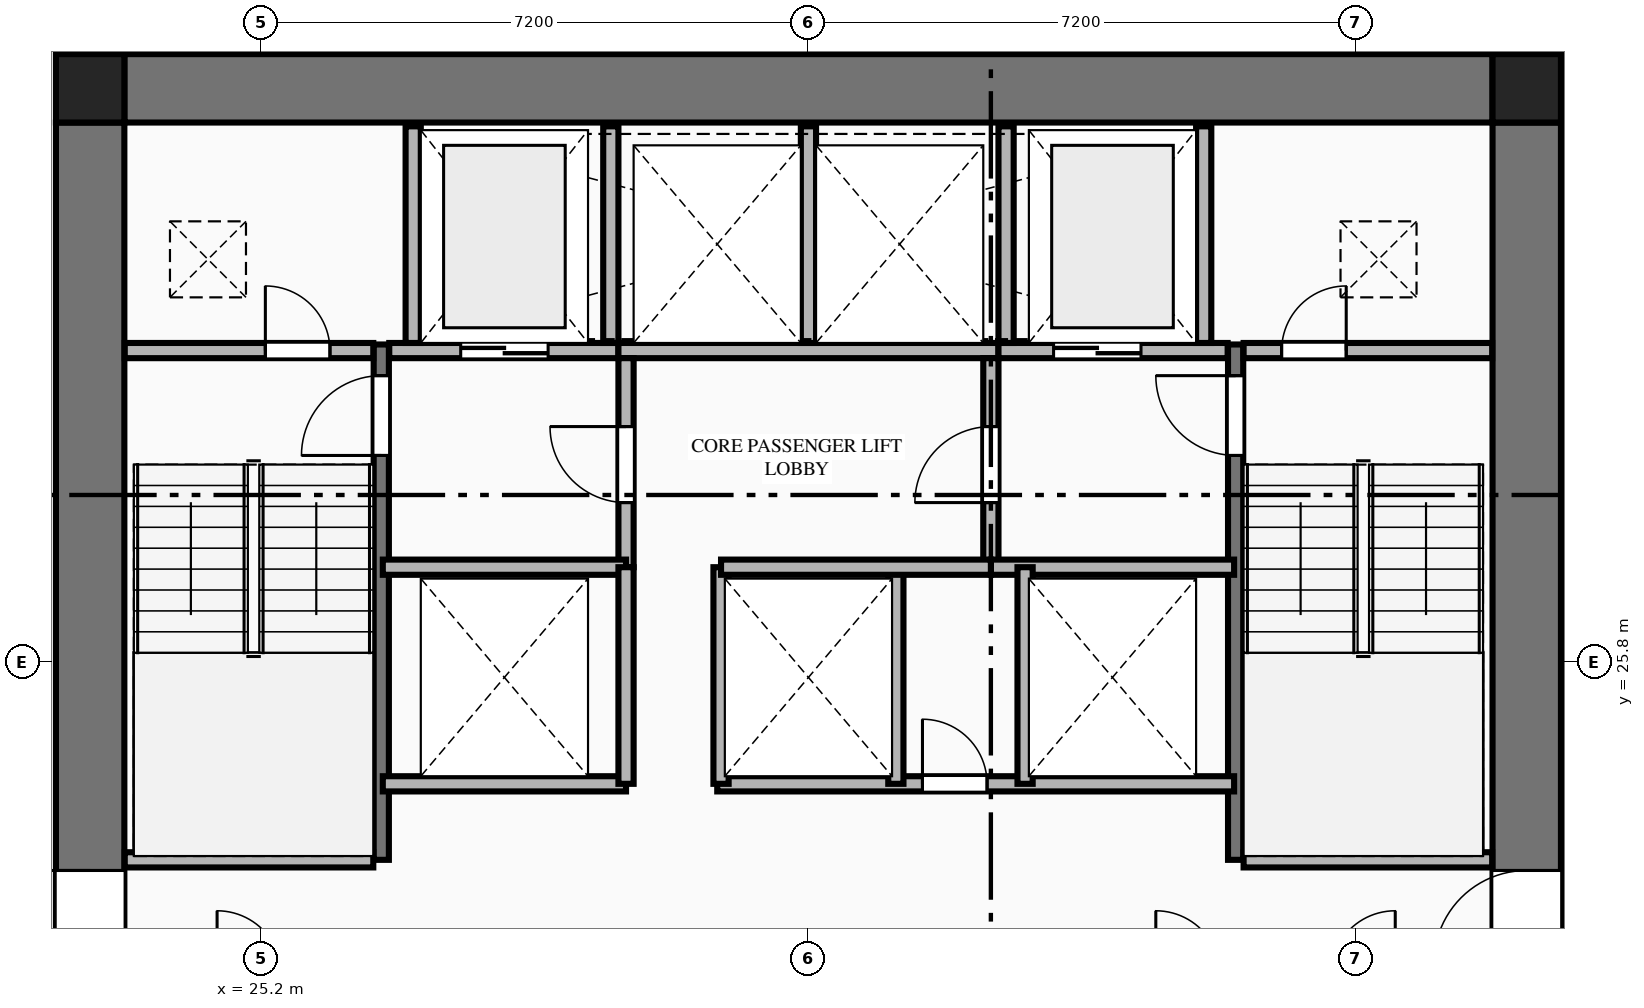
"""IFC4 building model, lengths in metres.
Left out: names, types, materials, properties, quantities, classifications, styles, units other than length and angle.
Written with IfcOpenShell. Run it as: python <this file> out.ifc"""

import sys

from ifc_helpers import new_model, si_unit, direction, frame, frame_2d, origin, origin_2d, place, context, subcontext, project, spatial, rectangle, extrude, element, fill, save


model = new_model("IFC4")
c1 = context("Model", 3, precision=1e-05, world=origin(), true_north=direction((0.0, 1.0)))
c2 = subcontext(c1, "Body", "Model", "MODEL_VIEW")
j1 = project(units=[si_unit("LENGTHUNIT", "METRE"), si_unit("PLANEANGLEUNIT", "RADIAN")], contexts=[c1])
p1 = place(None, origin())
s1 = spatial("IfcSite", under=j1, at=p1, CompositionType="ELEMENT")
p2 = place(p1, origin())
s2 = spatial("IfcBuilding", under=s1, at=p2, CompositionType="ELEMENT")
p3 = place(p2, frame((0.0, 0.0, 60.4)))
s3 = spatial("IfcBuildingStorey", under=s2, at=p3, CompositionType="ELEMENT", Elevation=60.4)
for number, where, z_axis, x_axis in (
    (1, (41.85, 33.35, 0.0), (0.0, 0.0, 1.0), (1.0, 0.0, 0.0)),
    (2, (22.95, 33.35, 0.0), (0.0, 0.0, 1.0), (1.0, 0.0, 0.0)),
):
    element("IfcColumn", number, at=place(p3, frame(where, z_axis=z_axis, x_axis=x_axis)), inside=s3, PredefinedType="COLUMN", context=c2, shape_type="SweptSolid", body=[
        extrude(rectangle(XDim=0.9, YDim=0.9, at=origin_2d()), origin(), (0.0, 0.0, 1.0), 3.55),
    ])
p4 = place(p3, frame((23.4, 33.35, 0.0), z_axis=(0.0, 0.0, 1.0), x_axis=(1.0, 0.0, 0.0)))
e3 = element("IfcWall", 3, at=p4, inside=s3, PredefinedType="SHEAR", context=c2, shape_type="SweptSolid", body=[
    extrude(rectangle(XDim=18.0, YDim=0.9, at=frame_2d((9.0, 0.0))), origin(), (0.0, 0.0, 1.0), 3.33),
])
p5 = place(p3, frame((22.95, 18.9, 0.0), z_axis=(0.0, 0.0, 1.0), x_axis=(0.0, 1.0, 0.0)))
e4 = element("IfcWall", 4, at=p5, inside=s3, PredefinedType="SHEAR", context=c2, shape_type="SweptSolid", body=[
    extrude(rectangle(XDim=14.0, YDim=0.9, at=frame_2d((7.0, 0.0))), origin(), (0.0, 0.0, 1.0), 3.33),
])
p6 = place(p5, frame((2.94, 0.0, 0.0)))
e5 = element("IfcOpeningElement", 5, at=p6, cuts=e4, PredefinedType="OPENING", context=c2, shape_type="SweptSolid", body=[
    extrude(rectangle(XDim=1.22, YDim=2.25, at=frame_2d((0.61, 1.125))), frame((0.0, 0.46, 0.0), z_axis=(0.0, -1.0, 0.0), x_axis=(1.0, 0.0, 0.0)), (0.0, 0.0, 1.0), 0.92),
])
p7 = place(p3, frame((41.85, 18.9, 0.0), z_axis=(0.0, 0.0, 1.0), x_axis=(0.0, 1.0, 0.0)))
e6 = element("IfcWall", 6, at=p7, inside=s3, PredefinedType="SHEAR", context=c2, shape_type="SweptSolid", body=[
    extrude(rectangle(XDim=14.0, YDim=0.9, at=frame_2d((7.0, 0.0))), origin(), (0.0, 0.0, 1.0), 3.33),
])
p8 = place(p7, frame((2.94, 0.0, 0.0)))
e7 = element("IfcOpeningElement", 7, at=p8, cuts=e6, PredefinedType="OPENING", context=c2, shape_type="SweptSolid", body=[
    extrude(rectangle(XDim=1.22, YDim=2.25, at=frame_2d((0.61, 1.125))), frame((0.0, 0.46, 0.0), z_axis=(0.0, -1.0, 0.0), x_axis=(1.0, 0.0, 0.0)), (0.0, 0.0, 1.0), 0.92),
])
p9 = place(p3, frame((26.78, 23.2, 0.0), z_axis=(0.0, 0.0, 1.0), x_axis=(0.0, 1.0, 0.0)))
e8 = element("IfcWall", 8, at=p9, inside=s3, PredefinedType="SHEAR", context=c2, shape_type="SweptSolid", body=[
    extrude(rectangle(XDim=6.78, YDim=0.2, at=frame_2d((3.39, 0.0))), origin(), (0.0, 0.0, 1.0), 3.55),
])
p10 = place(p9, frame((5.32, 0.0, 0.0)))
e9 = element("IfcOpeningElement", 9, at=p10, cuts=e8, PredefinedType="OPENING", context=c2, shape_type="SweptSolid", body=[
    extrude(rectangle(XDim=1.05, YDim=2.15, at=frame_2d((0.525, 1.075))), frame((0.0, 0.11, 0.0), z_axis=(0.0, -1.0, 0.0), x_axis=(1.0, 0.0, 0.0)), (0.0, 0.0, 1.0), 0.22),
])
p11 = place(p3, frame((23.405, 23.2, 0.0), z_axis=(0.0, 0.0, 1.0), x_axis=(1.0, 0.0, 0.0)))
e10 = element("IfcWall", 10, at=p11, inside=s3, PredefinedType="PLUMBINGWALL", context=c2, shape_type="SweptSolid", body=[
    extrude(rectangle(XDim=3.27, YDim=0.2, at=frame_2d((1.635, 0.0))), origin(), (0.0, 0.0, 1.0), 3.33),
])
p12 = place(p3, frame((38.02, 23.2, 0.0), z_axis=(0.0, 0.0, 1.0), x_axis=(0.0, 1.0, 0.0)))
e11 = element("IfcWall", 11, at=p12, inside=s3, PredefinedType="SHEAR", context=c2, shape_type="SweptSolid", body=[
    extrude(rectangle(XDim=6.78, YDim=0.2, at=frame_2d((3.39, 0.0))), origin(), (0.0, 0.0, 1.0), 3.55),
])
p13 = place(p12, frame((5.32, 0.0, 0.0)))
e12 = element("IfcOpeningElement", 12, at=p13, cuts=e11, PredefinedType="OPENING", context=c2, shape_type="SweptSolid", body=[
    extrude(rectangle(XDim=1.05, YDim=2.15, at=frame_2d((0.525, 1.075))), frame((0.0, 0.11, 0.0), z_axis=(0.0, -1.0, 0.0), x_axis=(1.0, 0.0, 0.0)), (0.0, 0.0, 1.0), 0.22),
])
p14 = place(p3, frame((38.125, 23.2, 0.0), z_axis=(0.0, 0.0, 1.0), x_axis=(1.0, 0.0, 0.0)))
e13 = element("IfcWall", 13, at=p14, inside=s3, PredefinedType="PLUMBINGWALL", context=c2, shape_type="SweptSolid", body=[
    extrude(rectangle(XDim=3.27, YDim=0.2, at=frame_2d((1.635, 0.0))), origin(), (0.0, 0.0, 1.0), 3.33),
])
p15 = place(p3, frame((23.405, 29.9, 0.0), z_axis=(0.0, 0.0, 1.0), x_axis=(1.0, 0.0, 0.0)))
e14 = element("IfcWall", 14, at=p15, inside=s3, PredefinedType="PLUMBINGWALL", context=c2, shape_type="SweptSolid", body=[
    extrude(rectangle(XDim=3.27, YDim=0.2, at=frame_2d((1.635, 0.0))), origin(), (0.0, 0.0, 1.0), 3.33),
])
p16 = place(p15, frame((1.85, 0.0, 0.0)))
e15 = element("IfcOpeningElement", 15, at=p16, cuts=e14, PredefinedType="OPENING", context=c2, shape_type="SweptSolid", body=[
    extrude(rectangle(XDim=0.85, YDim=2.05, at=frame_2d((0.425, 1.025))), frame((0.0, 0.11, 0.0), z_axis=(0.0, -1.0, 0.0), x_axis=(1.0, 0.0, 0.0)), (0.0, 0.0, 1.0), 0.22),
])
p17 = place(p3, frame((26.885, 29.9, 0.0), z_axis=(0.0, 0.0, 1.0), x_axis=(1.0, 0.0, 0.0)))
e16 = element("IfcWall", 16, at=p17, inside=s3, PredefinedType="PLUMBINGWALL", context=c2, shape_type="SweptSolid", body=[
    extrude(rectangle(XDim=3.015, YDim=0.2, at=frame_2d((1.507, 0.0))), origin(), (0.0, 0.0, 1.0), 3.33),
])
p18 = place(p17, frame((0.94, 0.0, 0.0)))
e17 = element("IfcOpeningElement", 17, at=p18, cuts=e16, PredefinedType="OPENING", context=c2, shape_type="SweptSolid", body=[
    extrude(rectangle(XDim=1.15, YDim=2.2, at=frame_2d((0.575, 1.1))), frame((0.0, 0.11, 0.0), z_axis=(0.0, -1.0, 0.0), x_axis=(1.0, 0.0, 0.0)), (0.0, 0.0, 1.0), 0.22),
])
p19 = place(p3, frame((29.9, 29.9, 0.0), z_axis=(0.0, 0.0, 1.0), x_axis=(1.0, 0.0, 0.0)))
e18 = element("IfcWall", 18, at=p19, inside=s3, PredefinedType="PLUMBINGWALL", context=c2, shape_type="SweptSolid", body=[
    extrude(rectangle(XDim=5.0, YDim=0.2, at=frame_2d((2.5, 0.0))), origin(), (0.0, 0.0, 1.0), 3.33),
])
p20 = place(p3, frame((34.9, 29.9, 0.0), z_axis=(0.0, 0.0, 1.0), x_axis=(1.0, 0.0, 0.0)))
e19 = element("IfcWall", 19, at=p20, inside=s3, PredefinedType="PLUMBINGWALL", context=c2, shape_type="SweptSolid", body=[
    extrude(rectangle(XDim=3.015, YDim=0.2, at=frame_2d((1.508, 0.0))), origin(), (0.0, 0.0, 1.0), 3.33),
])
p21 = place(p20, frame((0.725, 0.0, 0.0)))
e20 = element("IfcOpeningElement", 20, at=p21, cuts=e19, PredefinedType="OPENING", context=c2, shape_type="SweptSolid", body=[
    extrude(rectangle(XDim=1.15, YDim=2.2, at=frame_2d((0.575, 1.1))), frame((0.0, 0.11, 0.0), z_axis=(0.0, -1.0, 0.0), x_axis=(1.0, 0.0, 0.0)), (0.0, 0.0, 1.0), 0.22),
])
p22 = place(p3, frame((38.125, 29.9, 0.0), z_axis=(0.0, 0.0, 1.0), x_axis=(1.0, 0.0, 0.0)))
e21 = element("IfcWall", 21, at=p22, inside=s3, PredefinedType="PLUMBINGWALL", context=c2, shape_type="SweptSolid", body=[
    extrude(rectangle(XDim=3.27, YDim=0.2, at=frame_2d((1.635, 0.0))), origin(), (0.0, 0.0, 1.0), 3.33),
])
p23 = place(p22, frame((0.5, 0.0, 0.0)))
e22 = element("IfcOpeningElement", 22, at=p23, cuts=e21, PredefinedType="OPENING", context=c2, shape_type="SweptSolid", body=[
    extrude(rectangle(XDim=0.85, YDim=2.05, at=frame_2d((0.425, 1.025))), frame((0.0, 0.11, 0.0), z_axis=(0.0, -1.0, 0.0), x_axis=(1.0, 0.0, 0.0)), (0.0, 0.0, 1.0), 0.22),
])
for number, where, z_axis, x_axis in (
    (23, (27.2, 30.0, 0.0), (0.0, 0.0, 1.0), (0.0, 1.0, 0.0)),
    (24, (29.8, 30.0, 0.0), (0.0, 0.0, 1.0), (0.0, 1.0, 0.0)),
    (25, (32.4, 30.0, 0.0), (0.0, 0.0, 1.0), (0.0, 1.0, 0.0)),
    (26, (35.0, 30.0, 0.0), (0.0, 0.0, 1.0), (0.0, 1.0, 0.0)),
    (27, (37.6, 30.0, 0.0), (0.0, 0.0, 1.0), (0.0, 1.0, 0.0)),
):
    element("IfcWall", number, at=place(p3, frame(where, z_axis=z_axis, x_axis=x_axis)), inside=s3, PredefinedType="PLUMBINGWALL", context=c2, shape_type="SweptSolid", body=[
        extrude(rectangle(XDim=2.85, YDim=0.2, at=frame_2d((1.425, 0.0))), origin(), (0.0, 0.0, 1.0), 3.33),
    ])
p24 = place(p3, frame((30.0, 27.05, 0.0), z_axis=(0.0, 0.0, 1.0), x_axis=(0.0, 1.0, 0.0)))
e28 = element("IfcWall", 28, at=p24, inside=s3, PredefinedType="PLUMBINGWALL", context=c2, shape_type="SweptSolid", body=[
    extrude(rectangle(XDim=2.75, YDim=0.2, at=frame_2d((1.375, 0.0))), origin(), (0.0, 0.0, 1.0), 3.33),
])
p25 = place(p24, frame((0.85, 0.0, 0.0)))
e29 = element("IfcOpeningElement", 29, at=p25, cuts=e28, PredefinedType="OPENING", context=c2, shape_type="SweptSolid", body=[
    extrude(rectangle(XDim=1.0, YDim=2.15, at=frame_2d((0.5, 1.075))), frame((0.0, 0.11, 0.0), z_axis=(0.0, -1.0, 0.0), x_axis=(1.0, 0.0, 0.0)), (0.0, 0.0, 1.0), 0.22),
])
p26 = place(p3, frame((26.8, 27.05, 0.0), z_axis=(0.0, 0.0, 1.0), x_axis=(1.0, 0.0, 0.0)))
e30 = element("IfcWall", 30, at=p26, inside=s3, PredefinedType="PLUMBINGWALL", context=c2, shape_type="SweptSolid", body=[
    extrude(rectangle(XDim=3.2, YDim=0.2, at=frame_2d((1.6, 0.0))), origin(), (0.0, 0.0, 1.0), 3.33),
])
p27 = place(p3, frame((34.8, 27.05, 0.0), z_axis=(0.0, 0.0, 1.0), x_axis=(0.0, 1.0, 0.0)))
e31 = element("IfcWall", 31, at=p27, inside=s3, PredefinedType="PLUMBINGWALL", context=c2, shape_type="SweptSolid", body=[
    extrude(rectangle(XDim=2.75, YDim=0.2, at=frame_2d((1.375, 0.0))), origin(), (0.0, 0.0, 1.0), 3.33),
])
p28 = place(p27, frame((0.85, 0.0, 0.0)))
e32 = element("IfcOpeningElement", 32, at=p28, cuts=e31, PredefinedType="OPENING", context=c2, shape_type="SweptSolid", body=[
    extrude(rectangle(XDim=1.0, YDim=2.15, at=frame_2d((0.5, 1.075))), frame((0.0, 0.11, 0.0), z_axis=(0.0, -1.0, 0.0), x_axis=(1.0, 0.0, 0.0)), (0.0, 0.0, 1.0), 0.22),
])
for number, where, z_axis, x_axis in (
    (33, (34.8, 27.05, 0.0), (0.0, 0.0, 1.0), (1.0, 0.0, 0.0)),
    (34, (26.8, 24.2, 0.0), (0.0, 0.0, 1.0), (1.0, 0.0, 0.0)),
):
    element("IfcWall", number, at=place(p3, frame(where, z_axis=z_axis, x_axis=x_axis)), inside=s3, PredefinedType="PLUMBINGWALL", context=c2, shape_type="SweptSolid", body=[
        extrude(rectangle(XDim=3.2, YDim=0.2, at=frame_2d((1.6, 0.0))), origin(), (0.0, 0.0, 1.0), 3.33),
    ])
p29 = place(p3, frame((30.0, 24.2, 0.0), z_axis=(0.0, 0.0, 1.0), x_axis=(0.0, 1.0, 0.0)))
e35 = element("IfcWall", 35, at=p29, inside=s3, PredefinedType="PLUMBINGWALL", context=c2, shape_type="SweptSolid", body=[
    extrude(rectangle(XDim=2.85, YDim=0.2, at=frame_2d((1.425, 0.0))), origin(), (0.0, 0.0, 1.0), 3.33),
])
p30 = place(p3, frame((31.2, 24.2, 0.0), z_axis=(0.0, 0.0, 1.0), x_axis=(1.0, 0.0, 0.0)))
e36 = element("IfcWall", 36, at=p30, inside=s3, PredefinedType="PLUMBINGWALL", context=c2, shape_type="SweptSolid", body=[
    extrude(rectangle(XDim=6.8, YDim=0.2, at=frame_2d((3.4, 0.0))), origin(), (0.0, 0.0, 1.0), 3.33),
])
p31 = place(p30, frame((2.7, 0.0, 0.0)))
e37 = element("IfcOpeningElement", 37, at=p31, cuts=e36, PredefinedType="OPENING", context=c2, shape_type="SweptSolid", body=[
    extrude(rectangle(XDim=0.85, YDim=2.05, at=frame_2d((0.425, 1.025))), frame((0.0, 0.11, 0.0), z_axis=(0.0, -1.0, 0.0), x_axis=(1.0, 0.0, 0.0)), (0.0, 0.0, 1.0), 0.22),
])
for number, where, z_axis, x_axis in (
    (38, (31.25, 24.2, 0.0), (0.0, 0.0, 1.0), (0.0, 1.0, 0.0)),
    (39, (33.55, 24.2, 0.0), (0.0, 0.0, 1.0), (0.0, 1.0, 0.0)),
    (40, (35.25, 24.2, 0.0), (0.0, 0.0, 1.0), (0.0, 1.0, 0.0)),
):
    element("IfcWall", number, at=place(p3, frame(where, z_axis=z_axis, x_axis=x_axis)), inside=s3, PredefinedType="PLUMBINGWALL", context=c2, shape_type="SweptSolid", body=[
        extrude(rectangle(XDim=2.85, YDim=0.2, at=frame_2d((1.425, 0.0))), origin(), (0.0, 0.0, 1.0), 3.33),
    ])
p32 = place(p3, frame((31.25, 27.05, 0.0), z_axis=(0.0, 0.0, 1.0), x_axis=(1.0, 0.0, 0.0)))
e41 = element("IfcWall", 41, at=p32, inside=s3, PredefinedType="PLUMBINGWALL", context=c2, shape_type="SweptSolid", body=[
    extrude(rectangle(XDim=3.55, YDim=0.2, at=frame_2d((1.775, 0.0))), origin(), (0.0, 0.0, 1.0), 3.33),
])
p33 = place(p6, origin())
e42 = element("IfcDoor", 42, at=p33, inside=s3, OperationType="SINGLE_SWING_RIGHT", PredefinedType="DOOR", context=c2, shape_type="SweptSolid", body=[
    extrude(rectangle(XDim=1.22, YDim=2.25, at=frame_2d((0.61, 1.125))), frame((0.0, 0.025, 0.0), z_axis=(0.0, -1.0, 0.0), x_axis=(1.0, 0.0, 0.0)), (0.0, 0.0, 1.0), 0.05),
])
fill(e5, e42)
p34 = place(p8, origin())
e43 = element("IfcDoor", 43, at=p34, inside=s3, OperationType="SINGLE_SWING_LEFT", PredefinedType="DOOR", context=c2, shape_type="SweptSolid", body=[
    extrude(rectangle(XDim=1.22, YDim=2.25, at=frame_2d((0.61, 1.125))), frame((0.0, 0.025, 0.0), z_axis=(0.0, -1.0, 0.0), x_axis=(1.0, 0.0, 0.0)), (0.0, 0.0, 1.0), 0.05),
])
fill(e7, e43)
p35 = place(p10, origin())
e44 = element("IfcDoor", 44, at=p35, inside=s3, OperationType="SINGLE_SWING_LEFT", PredefinedType="DOOR", context=c2, shape_type="SweptSolid", body=[
    extrude(rectangle(XDim=1.05, YDim=2.15, at=frame_2d((0.525, 1.075))), frame((0.0, 0.025, 0.0), z_axis=(0.0, -1.0, 0.0), x_axis=(1.0, 0.0, 0.0)), (0.0, 0.0, 1.0), 0.05),
])
fill(e9, e44)
p36 = place(p13, origin())
e45 = element("IfcDoor", 45, at=p36, inside=s3, OperationType="SINGLE_SWING_RIGHT", PredefinedType="DOOR", context=c2, shape_type="SweptSolid", body=[
    extrude(rectangle(XDim=1.05, YDim=2.15, at=frame_2d((0.525, 1.075))), frame((0.0, 0.025, 0.0), z_axis=(0.0, -1.0, 0.0), x_axis=(1.0, 0.0, 0.0)), (0.0, 0.0, 1.0), 0.05),
])
fill(e12, e45)
p37 = place(p16, origin())
e46 = element("IfcDoor", 46, at=p37, inside=s3, OperationType="SINGLE_SWING_LEFT", PredefinedType="DOOR", context=c2, shape_type="SweptSolid", body=[
    extrude(rectangle(XDim=0.85, YDim=2.05, at=frame_2d((0.425, 1.025))), frame((0.0, 0.025, 0.0), z_axis=(0.0, -1.0, 0.0), x_axis=(1.0, 0.0, 0.0)), (0.0, 0.0, 1.0), 0.05),
])
fill(e15, e46)
p38 = place(p23, origin())
e47 = element("IfcDoor", 47, at=p38, inside=s3, OperationType="SINGLE_SWING_RIGHT", PredefinedType="DOOR", context=c2, shape_type="SweptSolid", body=[
    extrude(rectangle(XDim=0.85, YDim=2.05, at=frame_2d((0.425, 1.025))), frame((0.0, 0.025, 0.0), z_axis=(0.0, -1.0, 0.0), x_axis=(1.0, 0.0, 0.0)), (0.0, 0.0, 1.0), 0.05),
])
fill(e22, e47)
p39 = place(p18, origin())
e48 = element("IfcDoor", 48, at=p39, inside=s3, OperationType="DOUBLE_DOOR_SLIDING", PredefinedType="DOOR", context=c2, shape_type="SweptSolid", body=[
    extrude(rectangle(XDim=1.15, YDim=2.2, at=frame_2d((0.575, 1.1))), frame((0.0, 0.025, 0.0), z_axis=(0.0, -1.0, 0.0), x_axis=(1.0, 0.0, 0.0)), (0.0, 0.0, 1.0), 0.05),
])
fill(e17, e48)
p40 = place(p21, origin())
e49 = element("IfcDoor", 49, at=p40, inside=s3, OperationType="DOUBLE_DOOR_SLIDING", PredefinedType="DOOR", context=c2, shape_type="SweptSolid", body=[
    extrude(rectangle(XDim=1.15, YDim=2.2, at=frame_2d((0.575, 1.1))), frame((0.0, 0.025, 0.0), z_axis=(0.0, -1.0, 0.0), x_axis=(1.0, 0.0, 0.0)), (0.0, 0.0, 1.0), 0.05),
])
fill(e20, e49)
p41 = place(p25, origin())
e50 = element("IfcDoor", 50, at=p41, inside=s3, OperationType="SINGLE_SWING_RIGHT", PredefinedType="DOOR", context=c2, shape_type="SweptSolid", body=[
    extrude(rectangle(XDim=1.0, YDim=2.15, at=frame_2d((0.5, 1.075))), frame((0.0, 0.025, 0.0), z_axis=(0.0, -1.0, 0.0), x_axis=(1.0, 0.0, 0.0)), (0.0, 0.0, 1.0), 0.05),
])
fill(e29, e50)
p42 = place(p28, origin())
e51 = element("IfcDoor", 51, at=p42, inside=s3, OperationType="SINGLE_SWING_LEFT", PredefinedType="DOOR", context=c2, shape_type="SweptSolid", body=[
    extrude(rectangle(XDim=1.0, YDim=2.15, at=frame_2d((0.5, 1.075))), frame((0.0, 0.025, 0.0), z_axis=(0.0, -1.0, 0.0), x_axis=(1.0, 0.0, 0.0)), (0.0, 0.0, 1.0), 0.05),
])
fill(e32, e51)
p43 = place(p31, origin())
e52 = element("IfcDoor", 52, at=p43, inside=s3, OperationType="SINGLE_SWING_LEFT", PredefinedType="DOOR", context=c2, shape_type="SweptSolid", body=[
    extrude(rectangle(XDim=0.85, YDim=2.05, at=frame_2d((0.425, 1.025))), frame((0.0, 0.025, 0.0), z_axis=(0.0, -1.0, 0.0), x_axis=(1.0, 0.0, 0.0)), (0.0, 0.0, 1.0), 0.05),
])
fill(e37, e52)
save(model, sys.argv[1])
